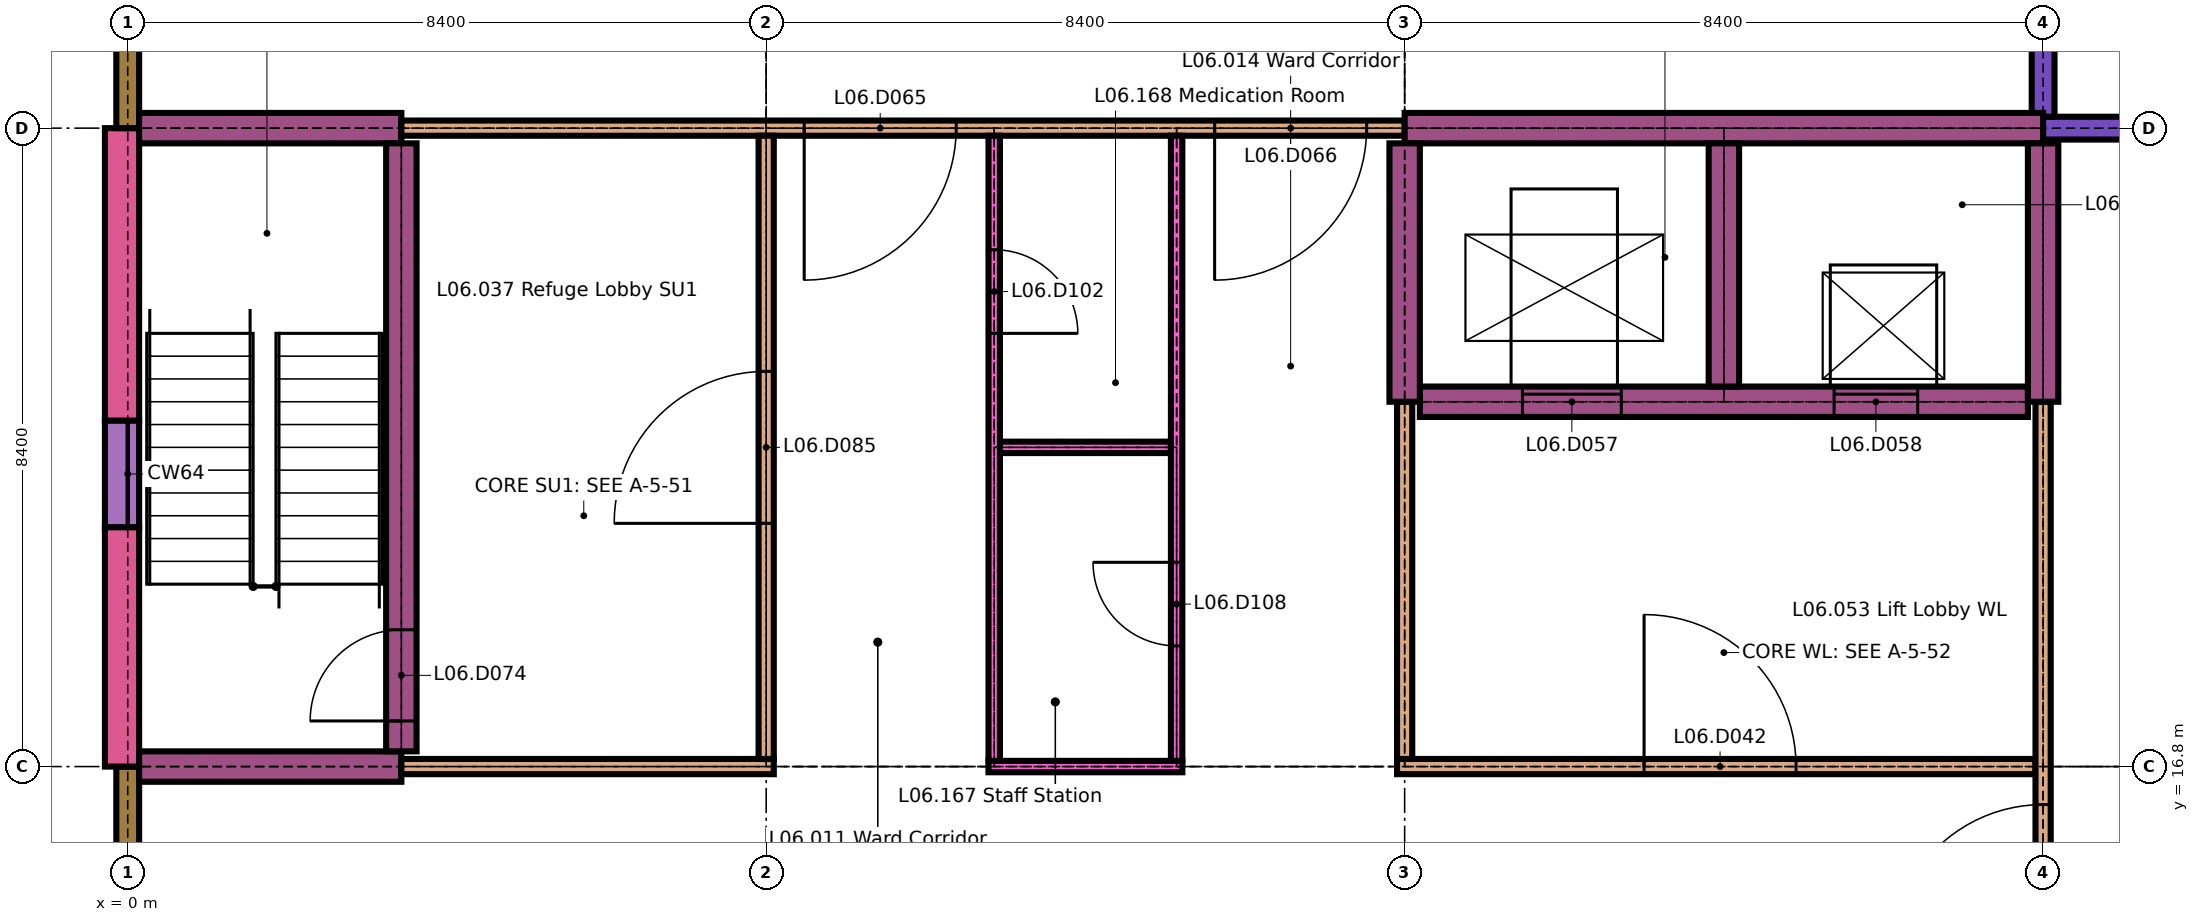
"""IFC4 building model, lengths in metres.
Left out: names, types, materials, properties, quantities, classifications, styles, units other than length and angle.
Written with IfcOpenShell. Run it as: python <this file> out.ifc"""

import sys

from ifc_helpers import new_model, si_unit, direction, frame, frame_2d, origin, place, context, subcontext, project, spatial, rectangle, extrude, element, fill, save


model = new_model("IFC4")
c1 = context("Model", 3, precision=1e-05, world=origin(), true_north=direction((0.0, 1.0)))
c2 = subcontext(c1, "Body", "Model", "MODEL_VIEW")
j1 = project(units=[si_unit("LENGTHUNIT", "METRE"), si_unit("PLANEANGLEUNIT", "RADIAN")], contexts=[c1])
p1 = place(None, origin())
s1 = spatial("IfcSite", under=j1, at=p1, CompositionType="ELEMENT")
p2 = place(p1, origin())
s2 = spatial("IfcBuilding", under=s1, at=p2, CompositionType="ELEMENT")
p3 = place(p2, frame((0.0, 0.0, 26.1)))
s3 = spatial("IfcBuildingStorey", under=s2, at=p3, CompositionType="ELEMENT", Elevation=26.1)
p4 = place(p3, frame((25.05, 25.2, 0.0), z_axis=(0.0, 0.0, 1.0), x_axis=(1.0, 0.0, 0.0)))
e1 = element("IfcWall", 1, at=p4, inside=s3, PredefinedType="SOLIDWALL", context=c2, shape_type="SweptSolid", body=[
    extrude(rectangle(XDim=1.45, YDim=0.3, at=frame_2d((0.725, 0.0))), origin(), (0.0, 0.0, 1.0), 3.3),
])
p5 = place(p3, frame((0.0, 13.8, 0.0), z_axis=(0.0, 0.0, 1.0), x_axis=(0.0, 1.0, 0.0)))
e2 = element("IfcWall", 2, at=p5, inside=s3, PredefinedType="SOLIDWALL", context=c2, shape_type="SweptSolid", body=[
    extrude(rectangle(XDim=3.0, YDim=0.3, at=frame_2d((1.5, 0.0))), origin(), (0.0, 0.0, 1.0), 2.9),
])
p6 = place(p5, frame((0.45, 0.0, 0.9)))
e3 = element("IfcOpeningElement", 3, at=p6, cuts=e2, PredefinedType="OPENING", context=c2, shape_type="SweptSolid", body=[
    extrude(rectangle(XDim=0.9, YDim=1.5, at=frame_2d((0.45, 0.75))), frame((0.0, 0.16, 0.0), z_axis=(0.0, -1.0, 0.0), x_axis=(1.0, 0.0, 0.0)), (0.0, 0.0, 1.0), 0.32),
])
p7 = place(p3, frame((-0.075, 16.8, 0.0), z_axis=(0.0, 0.0, 1.0), x_axis=(0.0, 1.0, 0.0)))
e4 = element("IfcWall", 4, at=p7, inside=s3, PredefinedType="SOLIDWALL", context=c2, shape_type="SweptSolid", body=[
    extrude(rectangle(XDim=3.15, YDim=0.45, at=frame_2d((1.575, 0.0))), origin(), (0.0, 0.0, 1.0), 3.3),
])
p8 = place(p3, frame((-0.075, 21.35, 0.0), z_axis=(0.0, 0.0, 1.0), x_axis=(0.0, 1.0, 0.0)))
e5 = element("IfcWall", 5, at=p8, inside=s3, PredefinedType="SOLIDWALL", context=c2, shape_type="SweptSolid", body=[
    extrude(rectangle(XDim=3.85, YDim=0.45, at=frame_2d((1.925, 0.0))), origin(), (0.0, 0.0, 1.0), 3.3),
])
p9 = place(p3, frame((-0.075, 19.95, 0.0), z_axis=(0.0, 0.0, 1.0), x_axis=(0.0, 1.0, 0.0)))
e6 = element("IfcWall", 6, at=p9, inside=s3, PredefinedType="SOLIDWALL", context=c2, shape_type="SweptSolid", body=[
    extrude(rectangle(XDim=1.4, YDim=0.45, at=frame_2d((0.7, 0.0))), origin(), (0.0, 0.0, 1.0), 0.6),
])
p10 = place(p3, frame((0.0, 25.2, 0.0), z_axis=(0.0, 0.0, 1.0), x_axis=(0.0, 1.0, 0.0)))
e7 = element("IfcWall", 7, at=p10, inside=s3, PredefinedType="SOLIDWALL", context=c2, shape_type="SweptSolid", body=[
    extrude(rectangle(XDim=1.3, YDim=0.3, at=frame_2d((0.65, 0.0))), origin(), (0.0, 0.0, 1.0), 2.9),
])
p11 = place(p3, frame((25.2, 25.35, 0.0), z_axis=(0.0, 0.0, 1.0), x_axis=(0.0, 1.0, 0.0)))
e8 = element("IfcWall", 8, at=p11, inside=s3, PredefinedType="SOLIDWALL", context=c2, shape_type="SweptSolid", body=[
    extrude(rectangle(XDim=1.15, YDim=0.3, at=frame_2d((0.575, 0.0))), origin(), (0.0, 0.0, 1.0), 3.3),
])
p12 = place(p3, frame((0.15, 16.8, 0.0), z_axis=(0.0, 0.0, 1.0), x_axis=(1.0, 0.0, 0.0)))
e9 = element("IfcWall", 9, at=p12, inside=s3, PredefinedType="SHEAR", context=c2, shape_type="SweptSolid", body=[
    extrude(rectangle(XDim=3.45, YDim=0.4, at=frame_2d((1.725, 0.0))), origin(), (0.0, 0.0, 1.0), 3.3),
])
p13 = place(p3, frame((3.6, 16.8, 0.0), z_axis=(0.0, 0.0, 1.0), x_axis=(1.0, 0.0, 0.0)))
e10 = element("IfcWall", 10, at=p13, inside=s3, PredefinedType="PARTITIONING", context=c2, shape_type="SweptSolid", body=[
    extrude(rectangle(XDim=4.9, YDim=0.2, at=frame_2d((2.45, 0.0))), origin(), (0.0, 0.0, 1.0), 3.3),
])
p14 = place(p3, frame((11.325, 16.8, 0.0), z_axis=(0.0, 0.0, 1.0), x_axis=(1.0, 0.0, 0.0)))
e11 = element("IfcWall", 11, at=p14, inside=s3, PredefinedType="PARTITIONING", context=c2, shape_type="SweptSolid", body=[
    extrude(rectangle(XDim=2.55, YDim=0.15, at=frame_2d((1.275, 0.0))), origin(), (0.0, 0.0, 1.0), 3.3),
])
p15 = place(p3, frame((16.7, 16.8, 0.0), z_axis=(0.0, 0.0, 1.0), x_axis=(1.0, 0.0, 0.0)))
e12 = element("IfcWall", 12, at=p15, inside=s3, PredefinedType="PARTITIONING", context=c2, shape_type="SweptSolid", body=[
    extrude(rectangle(XDim=8.4, YDim=0.2, at=frame_2d((4.2, 0.0))), origin(), (0.0, 0.0, 1.0), 3.3),
])
p16 = place(p15, frame((3.25, 0.0, 0.0)))
e13 = element("IfcOpeningElement", 13, at=p16, cuts=e12, PredefinedType="OPENING", context=c2, shape_type="SweptSolid", body=[
    extrude(rectangle(XDim=2.0, YDim=2.4, at=frame_2d((1.0, 1.2))), frame((0.0, 0.11, 0.0), z_axis=(0.0, -1.0, 0.0), x_axis=(1.0, 0.0, 0.0)), (0.0, 0.0, 1.0), 0.22),
])
p17 = place(p3, frame((11.475, 21.0, 0.0), z_axis=(0.0, 0.0, 1.0), x_axis=(1.0, 0.0, 0.0)))
e14 = element("IfcWall", 14, at=p17, inside=s3, PredefinedType="PARTITIONING", context=c2, shape_type="SweptSolid", body=[
    extrude(rectangle(XDim=2.25, YDim=0.15, at=frame_2d((1.125, 0.0))), origin(), (0.0, 0.0, 1.0), 3.3),
])
p18 = place(p3, frame((17.0, 21.6, 0.0), z_axis=(0.0, 0.0, 1.0), x_axis=(1.0, 0.0, 0.0)))
e15 = element("IfcWall", 15, at=p18, inside=s3, PredefinedType="SHEAR", context=c2, shape_type="SweptSolid", body=[
    extrude(rectangle(XDim=8.0, YDim=0.4, at=frame_2d((4.0, 0.0))), origin(), (0.0, 0.0, 1.0), 3.3),
])
p19 = place(p18, frame((1.35, 0.0, 0.0)))
e16 = element("IfcOpeningElement", 16, at=p19, cuts=e15, PredefinedType="OPENING", context=c2, shape_type="SweptSolid", body=[
    extrude(rectangle(XDim=1.3, YDim=2.1, at=frame_2d((0.65, 1.05))), frame((0.0, 0.21, 0.0), z_axis=(0.0, -1.0, 0.0), x_axis=(1.0, 0.0, 0.0)), (0.0, 0.0, 1.0), 0.42),
])
p20 = place(p18, frame((5.45, 0.0, 0.0)))
e17 = element("IfcOpeningElement", 17, at=p20, cuts=e15, PredefinedType="OPENING", context=c2, shape_type="SweptSolid", body=[
    extrude(rectangle(XDim=1.1, YDim=2.1, at=frame_2d((0.55, 1.05))), frame((0.0, 0.21, 0.0), z_axis=(0.0, -1.0, 0.0), x_axis=(1.0, 0.0, 0.0)), (0.0, 0.0, 1.0), 0.42),
])
p21 = place(p3, frame((0.15, 25.2, 0.0), z_axis=(0.0, 0.0, 1.0), x_axis=(1.0, 0.0, 0.0)))
e18 = element("IfcWall", 18, at=p21, inside=s3, PredefinedType="SHEAR", context=c2, shape_type="SweptSolid", body=[
    extrude(rectangle(XDim=3.45, YDim=0.4, at=frame_2d((1.725, 0.0))), origin(), (0.0, 0.0, 1.0), 3.3),
])
p22 = place(p3, frame((3.6, 25.2, 0.0), z_axis=(0.0, 0.0, 1.0), x_axis=(1.0, 0.0, 0.0)))
e19 = element("IfcWall", 19, at=p22, inside=s3, PredefinedType="PARTITIONING", context=c2, shape_type="SweptSolid", body=[
    extrude(rectangle(XDim=13.2, YDim=0.2, at=frame_2d((6.6, 0.0))), origin(), (0.0, 0.0, 1.0), 3.3),
])
p23 = place(p22, frame((5.3, 0.0, 0.0)))
e20 = element("IfcOpeningElement", 20, at=p23, cuts=e19, PredefinedType="OPENING", context=c2, shape_type="SweptSolid", body=[
    extrude(rectangle(XDim=2.0, YDim=2.4, at=frame_2d((1.0, 1.2))), frame((0.0, 0.11, 0.0), z_axis=(0.0, -1.0, 0.0), x_axis=(1.0, 0.0, 0.0)), (0.0, 0.0, 1.0), 0.22),
])
p24 = place(p22, frame((10.7, 0.0, 0.0)))
e21 = element("IfcOpeningElement", 21, at=p24, cuts=e19, PredefinedType="OPENING", context=c2, shape_type="SweptSolid", body=[
    extrude(rectangle(XDim=2.0, YDim=2.4, at=frame_2d((1.0, 1.2))), frame((0.0, 0.11, 0.0), z_axis=(0.0, -1.0, 0.0), x_axis=(1.0, 0.0, 0.0)), (0.0, 0.0, 1.0), 0.22),
])
p25 = place(p3, frame((16.8, 25.2, 0.0), z_axis=(0.0, 0.0, 1.0), x_axis=(1.0, 0.0, 0.0)))
e22 = element("IfcWall", 22, at=p25, inside=s3, PredefinedType="SHEAR", context=c2, shape_type="SweptSolid", body=[
    extrude(rectangle(XDim=8.4, YDim=0.4, at=frame_2d((4.2, 0.0))), origin(), (0.0, 0.0, 1.0), 3.3),
])
p26 = place(p3, frame((3.6, 17.0, 0.0), z_axis=(0.0, 0.0, 1.0), x_axis=(0.0, 1.0, 0.0)))
e23 = element("IfcWall", 23, at=p26, inside=s3, PredefinedType="SHEAR", context=c2, shape_type="SweptSolid", body=[
    extrude(rectangle(XDim=8.0, YDim=0.4, at=frame_2d((4.0, 0.0))), origin(), (0.0, 0.0, 1.0), 3.3),
])
p27 = place(p26, frame((0.4, 0.0, 0.0)))
e24 = element("IfcOpeningElement", 24, at=p27, cuts=e23, PredefinedType="OPENING", context=c2, shape_type="SweptSolid", body=[
    extrude(rectangle(XDim=1.2, YDim=2.1, at=frame_2d((0.6, 1.05))), frame((0.0, 0.21, 0.0), z_axis=(0.0, -1.0, 0.0), x_axis=(1.0, 0.0, 0.0)), (0.0, 0.0, 1.0), 0.42),
])
p28 = place(p3, frame((8.4, 16.9, 0.0), z_axis=(0.0, 0.0, 1.0), x_axis=(0.0, 1.0, 0.0)))
e25 = element("IfcWall", 25, at=p28, inside=s3, PredefinedType="PARTITIONING", context=c2, shape_type="SweptSolid", body=[
    extrude(rectangle(XDim=8.2, YDim=0.2, at=frame_2d((4.1, 0.0))), origin(), (0.0, 0.0, 1.0), 3.3),
])
p29 = place(p28, frame((3.1, 0.0, 0.0)))
e26 = element("IfcOpeningElement", 26, at=p29, cuts=e25, PredefinedType="OPENING", context=c2, shape_type="SweptSolid", body=[
    extrude(rectangle(XDim=2.0, YDim=2.4, at=frame_2d((1.0, 1.2))), frame((0.0, 0.11, 0.0), z_axis=(0.0, -1.0, 0.0), x_axis=(1.0, 0.0, 0.0)), (0.0, 0.0, 1.0), 0.22),
])
p30 = place(p3, frame((11.4, 16.875, 0.0), z_axis=(0.0, 0.0, 1.0), x_axis=(0.0, 1.0, 0.0)))
e27 = element("IfcWall", 27, at=p30, inside=s3, PredefinedType="PARTITIONING", context=c2, shape_type="SweptSolid", body=[
    extrude(rectangle(XDim=8.225, YDim=0.15, at=frame_2d((4.113, 0.0))), origin(), (0.0, 0.0, 1.0), 3.3),
])
p31 = place(p30, frame((5.625, 0.0, 0.0)))
e28 = element("IfcOpeningElement", 28, at=p31, cuts=e27, PredefinedType="OPENING", context=c2, shape_type="SweptSolid", body=[
    extrude(rectangle(XDim=1.1, YDim=2.1, at=frame_2d((0.55, 1.05))), frame((0.0, 0.085, 0.0), z_axis=(0.0, -1.0, 0.0), x_axis=(1.0, 0.0, 0.0)), (0.0, 0.0, 1.0), 0.17),
])
p32 = place(p3, frame((13.8, 16.875, 0.0), z_axis=(0.0, 0.0, 1.0), x_axis=(0.0, 1.0, 0.0)))
e29 = element("IfcWall", 29, at=p32, inside=s3, PredefinedType="PARTITIONING", context=c2, shape_type="SweptSolid", body=[
    extrude(rectangle(XDim=8.225, YDim=0.15, at=frame_2d((4.113, 0.0))), origin(), (0.0, 0.0, 1.0), 3.3),
])
p33 = place(p32, frame((1.512, 0.0, 0.0)))
e30 = element("IfcOpeningElement", 30, at=p33, cuts=e29, PredefinedType="OPENING", context=c2, shape_type="SweptSolid", body=[
    extrude(rectangle(XDim=1.1, YDim=2.1, at=frame_2d((0.55, 1.05))), frame((0.0, 0.085, 0.0), z_axis=(0.0, -1.0, 0.0), x_axis=(1.0, 0.0, 0.0)), (0.0, 0.0, 1.0), 0.17),
])
p34 = place(p3, frame((16.8, 16.9, 0.0), z_axis=(0.0, 0.0, 1.0), x_axis=(0.0, 1.0, 0.0)))
e31 = element("IfcWall", 31, at=p34, inside=s3, PredefinedType="PARTITIONING", context=c2, shape_type="SweptSolid", body=[
    extrude(rectangle(XDim=4.7, YDim=0.2, at=frame_2d((2.35, 0.0))), origin(), (0.0, 0.0, 1.0), 3.3),
])
p35 = place(p3, frame((16.8, 21.6, 0.0), z_axis=(0.0, 0.0, 1.0), x_axis=(0.0, 1.0, 0.0)))
e32 = element("IfcWall", 32, at=p35, inside=s3, PredefinedType="SHEAR", context=c2, shape_type="SweptSolid", body=[
    extrude(rectangle(XDim=3.4, YDim=0.4, at=frame_2d((1.7, 0.0))), origin(), (0.0, 0.0, 1.0), 3.3),
])
p36 = place(p3, frame((21.0, 21.8, 0.0), z_axis=(0.0, 0.0, 1.0), x_axis=(0.0, 1.0, 0.0)))
e33 = element("IfcWall", 33, at=p36, inside=s3, PredefinedType="SHEAR", context=c2, shape_type="SweptSolid", body=[
    extrude(rectangle(XDim=3.2, YDim=0.4, at=frame_2d((1.6, 0.0))), origin(), (0.0, 0.0, 1.0), 3.3),
])
p37 = place(p3, frame((25.2, 8.75, 0.0), z_axis=(0.0, 0.0, 1.0), x_axis=(0.0, 1.0, 0.0)))
e34 = element("IfcWall", 34, at=p37, inside=s3, PredefinedType="PARTITIONING", context=c2, shape_type="SweptSolid", body=[
    extrude(rectangle(XDim=12.85, YDim=0.2, at=frame_2d((6.425, 0.0))), origin(), (0.0, 0.0, 1.0), 3.3),
])
p38 = place(p37, frame((0.325, 0.0, 0.0)))
e35 = element("IfcOpeningElement", 35, at=p38, cuts=e34, PredefinedType="OPENING", context=c2, shape_type="SweptSolid", body=[
    extrude(rectangle(XDim=2.0, YDim=2.4, at=frame_2d((1.0, 1.2))), frame((0.0, 0.11, 0.0), z_axis=(0.0, -1.0, 0.0), x_axis=(1.0, 0.0, 0.0)), (0.0, 0.0, 1.0), 0.22),
])
p39 = place(p37, frame((5.55, 0.0, 0.0)))
e36 = element("IfcOpeningElement", 36, at=p39, cuts=e34, PredefinedType="OPENING", context=c2, shape_type="SweptSolid", body=[
    extrude(rectangle(XDim=2.0, YDim=2.4, at=frame_2d((1.0, 1.2))), frame((0.0, 0.11, 0.0), z_axis=(0.0, -1.0, 0.0), x_axis=(1.0, 0.0, 0.0)), (0.0, 0.0, 1.0), 0.22),
])
p40 = place(p3, frame((25.2, 21.6, 0.0), z_axis=(0.0, 0.0, 1.0), x_axis=(0.0, 1.0, 0.0)))
e37 = element("IfcWall", 37, at=p40, inside=s3, PredefinedType="SHEAR", context=c2, shape_type="SweptSolid", body=[
    extrude(rectangle(XDim=3.4, YDim=0.4, at=frame_2d((1.7, 0.0))), origin(), (0.0, 0.0, 1.0), 3.3),
])
p41 = place(p16, origin())
e38 = element("IfcDoor", 38, at=p41, inside=s3, OperationType="SINGLE_SWING_RIGHT", PredefinedType="DOOR", context=c2, shape_type="SweptSolid", body=[
    extrude(rectangle(XDim=2.0, YDim=2.4, at=frame_2d((1.0, 1.2))), frame((0.0, 0.03, 0.0), z_axis=(0.0, -1.0, 0.0), x_axis=(1.0, 0.0, 0.0)), (0.0, 0.0, 1.0), 0.06),
])
fill(e13, e38)
p42 = place(p19, origin())
e39 = element("IfcDoor", 39, at=p42, inside=s3, OperationType="SLIDING_TO_LEFT", PredefinedType="DOOR", context=c2, shape_type="SweptSolid", body=[
    extrude(rectangle(XDim=1.3, YDim=2.1, at=frame_2d((0.65, 1.05))), frame((0.0, 0.025, 0.0), z_axis=(0.0, -1.0, 0.0), x_axis=(1.0, 0.0, 0.0)), (0.0, 0.0, 1.0), 0.05),
])
fill(e16, e39)
p43 = place(p20, origin())
e40 = element("IfcDoor", 40, at=p43, inside=s3, OperationType="SLIDING_TO_LEFT", PredefinedType="DOOR", context=c2, shape_type="SweptSolid", body=[
    extrude(rectangle(XDim=1.1, YDim=2.1, at=frame_2d((0.55, 1.05))), frame((0.0, 0.025, 0.0), z_axis=(0.0, -1.0, 0.0), x_axis=(1.0, 0.0, 0.0)), (0.0, 0.0, 1.0), 0.05),
])
fill(e17, e40)
p44 = place(p23, origin())
e41 = element("IfcDoor", 41, at=p44, inside=s3, OperationType="SINGLE_SWING_LEFT", PredefinedType="DOOR", context=c2, shape_type="SweptSolid", body=[
    extrude(rectangle(XDim=2.0, YDim=2.4, at=frame_2d((1.0, 1.2))), frame((0.0, 0.03, 0.0), z_axis=(0.0, -1.0, 0.0), x_axis=(1.0, 0.0, 0.0)), (0.0, 0.0, 1.0), 0.06),
])
fill(e20, e41)
p45 = place(p24, origin())
e42 = element("IfcDoor", 42, at=p45, inside=s3, OperationType="SINGLE_SWING_LEFT", PredefinedType="DOOR", context=c2, shape_type="SweptSolid", body=[
    extrude(rectangle(XDim=2.0, YDim=2.4, at=frame_2d((1.0, 1.2))), frame((0.0, 0.03, 0.0), z_axis=(0.0, -1.0, 0.0), x_axis=(1.0, 0.0, 0.0)), (0.0, 0.0, 1.0), 0.06),
])
fill(e21, e42)
p46 = place(p27, origin())
e43 = element("IfcDoor", 43, at=p46, inside=s3, OperationType="SINGLE_SWING_RIGHT", PredefinedType="DOOR", context=c2, shape_type="SweptSolid", body=[
    extrude(rectangle(XDim=1.2, YDim=2.1, at=frame_2d((0.6, 1.05))), frame((0.0, 0.025, 0.0), z_axis=(0.0, -1.0, 0.0), x_axis=(1.0, 0.0, 0.0)), (0.0, 0.0, 1.0), 0.05),
])
fill(e24, e43)
p47 = place(p29, origin())
e44 = element("IfcDoor", 44, at=p47, inside=s3, OperationType="SINGLE_SWING_RIGHT", PredefinedType="DOOR", context=c2, shape_type="SweptSolid", body=[
    extrude(rectangle(XDim=2.0, YDim=2.4, at=frame_2d((1.0, 1.2))), frame((0.0, 0.03, 0.0), z_axis=(0.0, -1.0, 0.0), x_axis=(1.0, 0.0, 0.0)), (0.0, 0.0, 1.0), 0.06),
])
fill(e26, e44)
p48 = place(p31, origin())
e45 = element("IfcDoor", 45, at=p48, inside=s3, OperationType="SINGLE_SWING_LEFT", PredefinedType="DOOR", context=c2, shape_type="SweptSolid", body=[
    extrude(rectangle(XDim=1.1, YDim=2.1, at=frame_2d((0.55, 1.05))), frame((0.0, 0.025, 0.0), z_axis=(0.0, -1.0, 0.0), x_axis=(1.0, 0.0, 0.0)), (0.0, 0.0, 1.0), 0.05),
])
fill(e28, e45)
p49 = place(p33, origin())
e46 = element("IfcDoor", 46, at=p49, inside=s3, OperationType="SINGLE_SWING_LEFT", PredefinedType="DOOR", context=c2, shape_type="SweptSolid", body=[
    extrude(rectangle(XDim=1.1, YDim=2.1, at=frame_2d((0.55, 1.05))), frame((0.0, 0.025, 0.0), z_axis=(0.0, -1.0, 0.0), x_axis=(1.0, 0.0, 0.0)), (0.0, 0.0, 1.0), 0.05),
])
fill(e30, e46)
p50 = place(p39, origin())
e47 = element("IfcDoor", 47, at=p50, inside=s3, OperationType="SINGLE_SWING_RIGHT", PredefinedType="DOOR", context=c2, shape_type="SweptSolid", body=[
    extrude(rectangle(XDim=2.0, YDim=2.4, at=frame_2d((1.0, 1.2))), frame((0.0, 0.03, 0.0), z_axis=(0.0, -1.0, 0.0), x_axis=(1.0, 0.0, 0.0)), (0.0, 0.0, 1.0), 0.06),
])
fill(e36, e47)
save(model, sys.argv[1])
